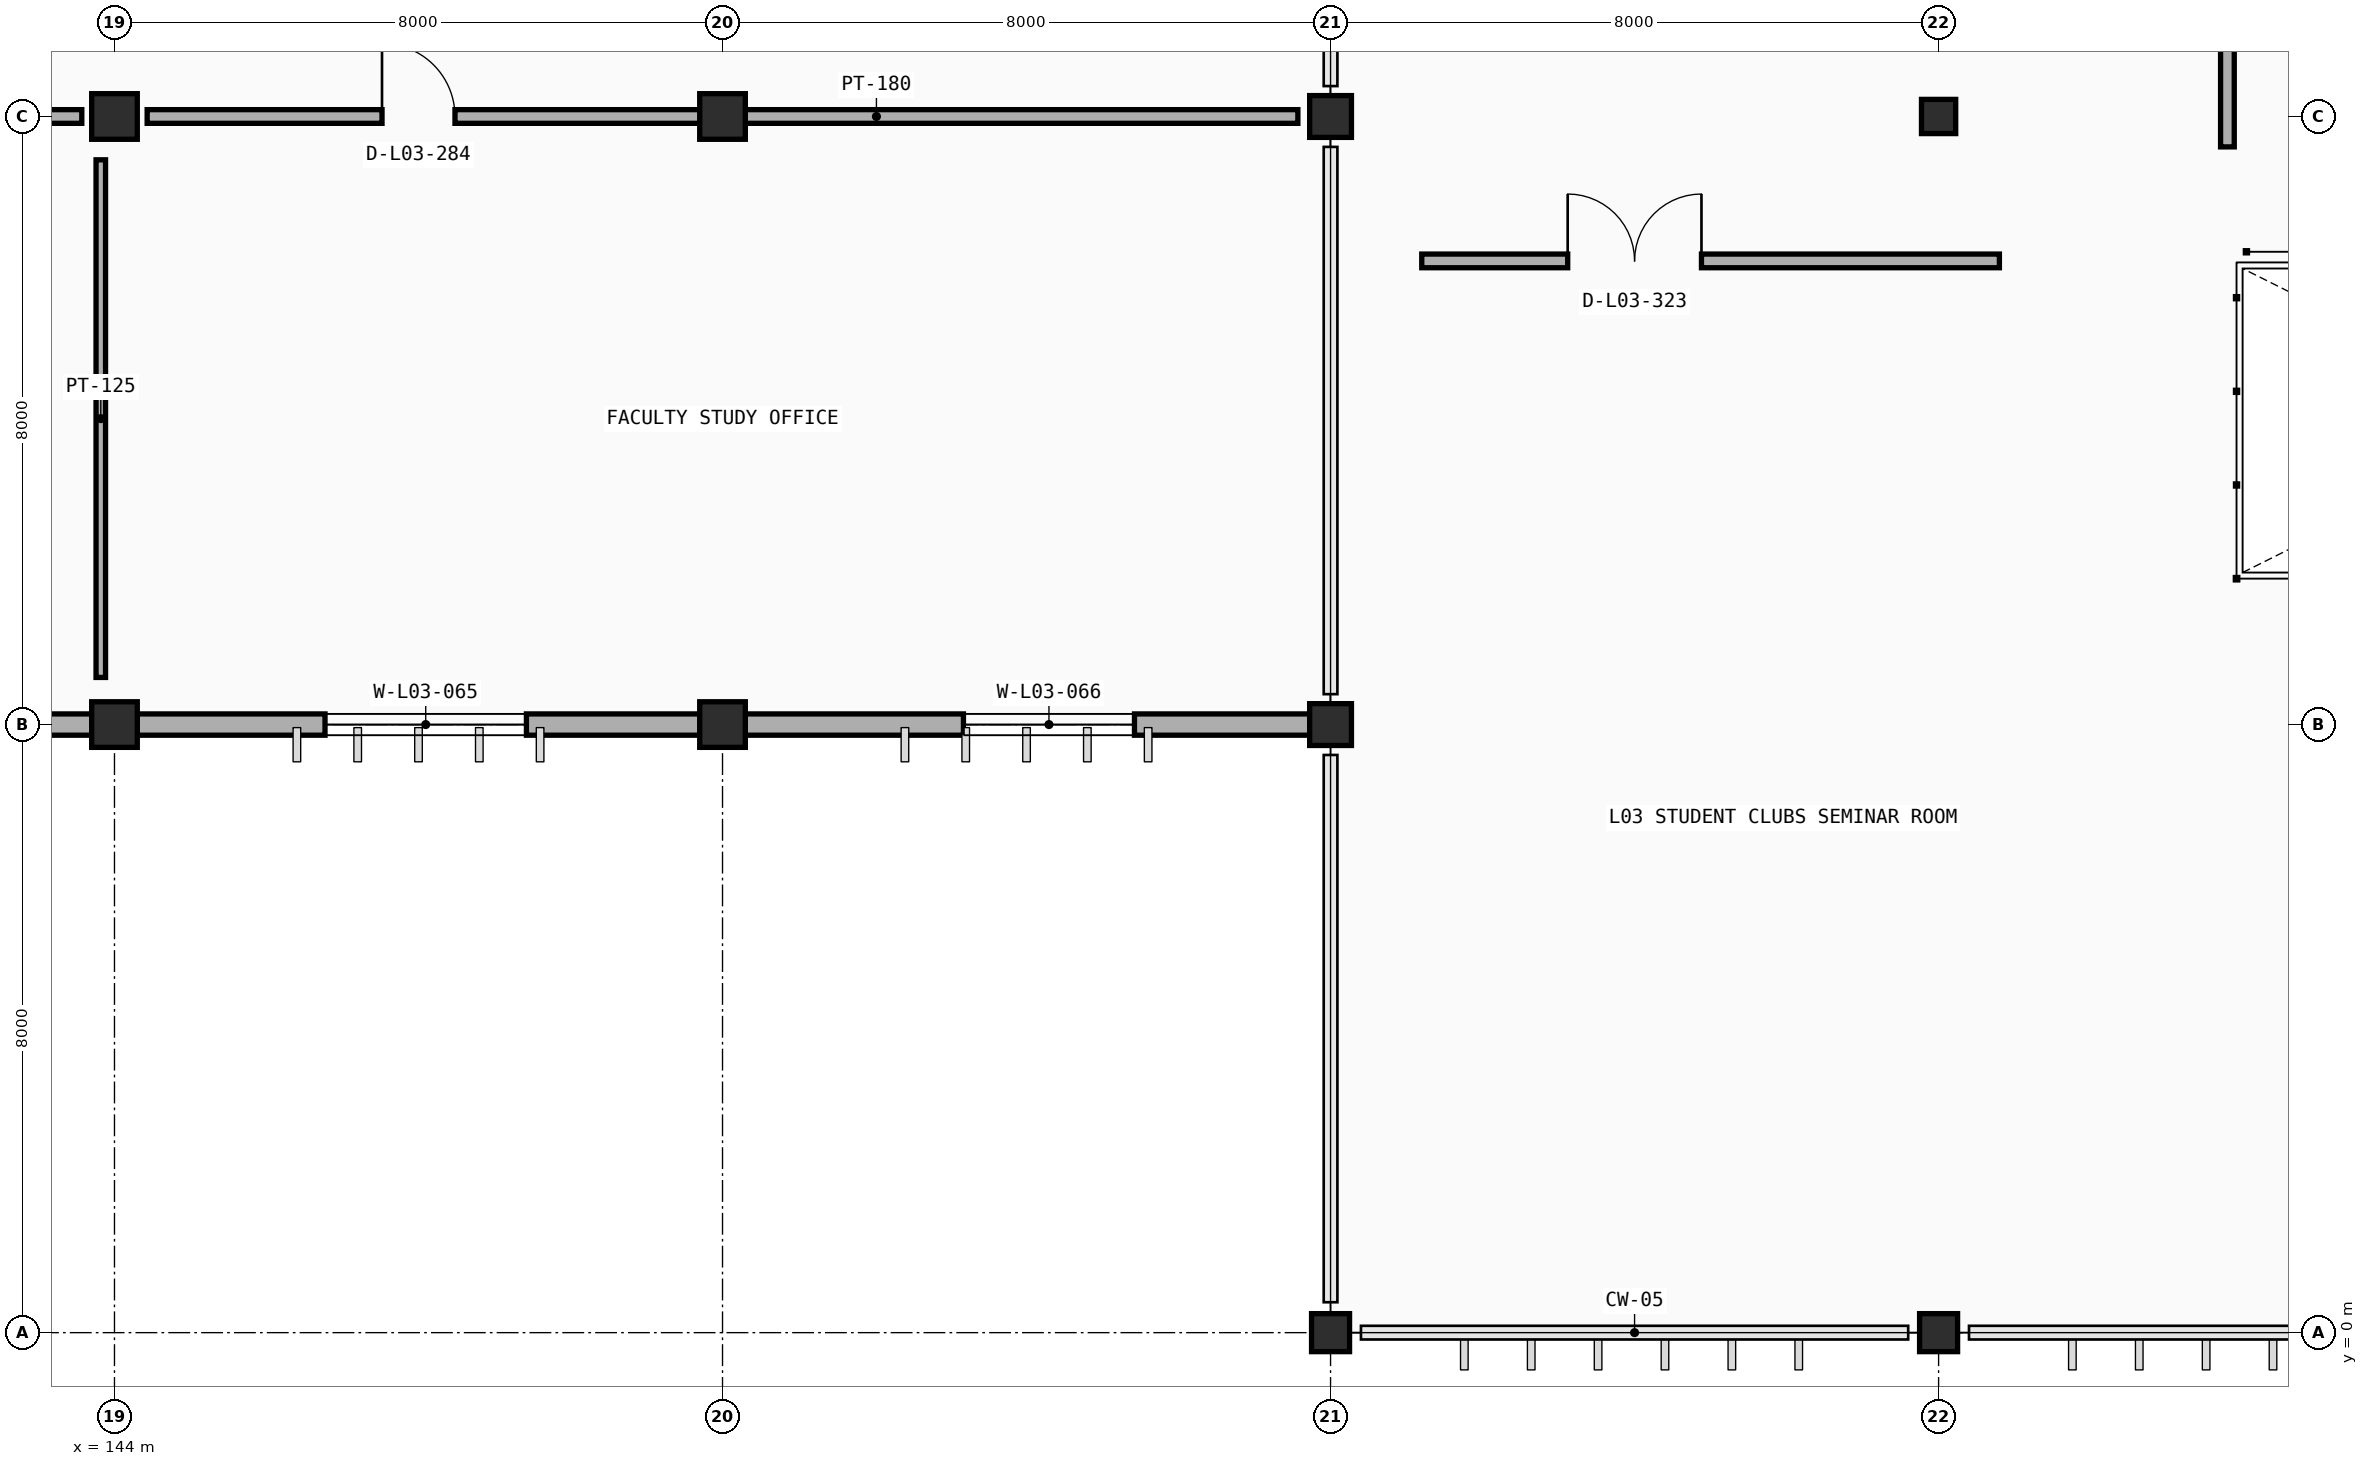
"""IFC4 building model, lengths in metres.
Left out: names, types, materials, properties, quantities, classifications, styles, units other than length and angle.
Written with IfcOpenShell. Run it as: python <this file> out.ifc"""

import sys

from ifc_helpers import new_model, si_unit, direction, frame, frame_2d, origin, origin_2d, place, context, subcontext, project, spatial, rectangle, extrude, element, fill, save


model = new_model("IFC4")
c1 = context("Model", 3, precision=1e-05, world=origin(), true_north=direction((0.0, 1.0)))
c2 = subcontext(c1, "Body", "Model", "MODEL_VIEW")
j1 = project(units=[si_unit("LENGTHUNIT", "METRE"), si_unit("PLANEANGLEUNIT", "RADIAN")], contexts=[c1])
p1 = place(None, origin())
s1 = spatial("IfcSite", under=j1, at=p1, CompositionType="ELEMENT")
p2 = place(p1, origin())
s2 = spatial("IfcBuilding", under=s1, at=p2, CompositionType="ELEMENT")
p3 = place(p2, frame((0.0, 0.0, 9.6)))
s3 = spatial("IfcBuildingStorey", under=s2, at=p3, CompositionType="ELEMENT", Elevation=9.6)
for number, where, z_axis, x_axis in (
    (1, (160.0, 0.0, 0.0), (0.0, 0.0, 1.0), (0.0, 1.0, 0.0)),
    (2, (168.0, 0.0, 0.0), (0.0, 0.0, 1.0), (0.0, 1.0, 0.0)),
):
    element("IfcColumn", number, at=place(p3, frame(where, z_axis=z_axis, x_axis=x_axis)), inside=s3, PredefinedType="COLUMN", context=c2, shape_type="SweptSolid", body=[
        extrude(rectangle(XDim=0.5, YDim=0.5, at=origin_2d()), origin(), (0.0, 0.0, 1.0), 4.2),
    ])
for number, where, z_axis, x_axis in (
    (3, (144.0, 8.0, 0.0), (0.0, 0.0, 1.0), (1.0, 0.0, 0.0)),
    (4, (152.0, 8.0, 0.0), (0.0, 0.0, 1.0), (1.0, 0.0, 0.0)),
):
    element("IfcColumn", number, at=place(p3, frame(where, z_axis=z_axis, x_axis=x_axis)), inside=s3, PredefinedType="COLUMN", context=c2, shape_type="SweptSolid", body=[
        extrude(rectangle(XDim=0.6, YDim=0.6, at=origin_2d()), origin(), (0.0, 0.0, 1.0), 4.2),
    ])
p4 = place(p3, frame((160.0, 8.0, 0.0), z_axis=(0.0, 0.0, 1.0), x_axis=(1.0, 0.0, 0.0)))
e5 = element("IfcColumn", 5, at=p4, inside=s3, PredefinedType="COLUMN", context=c2, shape_type="SweptSolid", body=[
    extrude(rectangle(XDim=0.55, YDim=0.55, at=origin_2d()), origin(), (0.0, 0.0, 1.0), 4.2),
])
for number, where, z_axis, x_axis in (
    (6, (144.0, 16.0, 0.0), (0.0, 0.0, 1.0), (1.0, 0.0, 0.0)),
    (7, (152.0, 16.0, 0.0), (0.0, 0.0, 1.0), (1.0, 0.0, 0.0)),
):
    element("IfcColumn", number, at=place(p3, frame(where, z_axis=z_axis, x_axis=x_axis)), inside=s3, PredefinedType="COLUMN", context=c2, shape_type="SweptSolid", body=[
        extrude(rectangle(XDim=0.6, YDim=0.6, at=origin_2d()), origin(), (0.0, 0.0, 1.0), 4.2),
    ])
p5 = place(p3, frame((160.0, 16.0, 0.0), z_axis=(0.0, 0.0, 1.0), x_axis=(1.0, 0.0, 0.0)))
e8 = element("IfcColumn", 8, at=p5, inside=s3, PredefinedType="COLUMN", context=c2, shape_type="SweptSolid", body=[
    extrude(rectangle(XDim=0.55, YDim=0.55, at=origin_2d()), origin(), (0.0, 0.0, 1.0), 4.2),
])
p6 = place(p3, frame((168.0, 16.0, 0.0), z_axis=(0.0, 0.0, 1.0), x_axis=(1.0, 0.0, 0.0)))
e9 = element("IfcColumn", 9, at=p6, inside=s3, PredefinedType="COLUMN", context=c2, shape_type="SweptSolid", body=[
    extrude(rectangle(XDim=0.45, YDim=0.45, at=origin_2d()), origin(), (0.0, 0.0, 1.0), 4.2),
])
p7 = place(p3, frame((143.703, 8.0, 0.0), z_axis=(0.0, 0.0, 1.0), x_axis=(-1.0, 0.0, 0.0)))
e10 = element("IfcWall", 10, at=p7, inside=s3, PredefinedType="STANDARD", context=c2, shape_type="SweptSolid", body=[
    extrude(rectangle(XDim=7.406, YDim=0.28, at=frame_2d((3.703, 0.0))), origin(), (0.0, 0.0, 1.0), 3.325),
])
p8 = place(p7, frame((2.283, 0.0, 0.9)))
e11 = element("IfcOpeningElement", 11, at=p8, cuts=e10, PredefinedType="OPENING", context=c2, shape_type="SweptSolid", body=[
    extrude(rectangle(XDim=2.45, YDim=1.25, at=frame_2d((1.225, 0.625))), frame((0.0, 0.15, 0.0), z_axis=(0.0, -1.0, 0.0), x_axis=(1.0, 0.0, 0.0)), (0.0, 0.0, 1.0), 0.3),
])
p9 = place(p3, frame((151.703, 8.0, 0.0), z_axis=(0.0, 0.0, 1.0), x_axis=(-1.0, 0.0, 0.0)))
e12 = element("IfcWall", 12, at=p9, inside=s3, PredefinedType="STANDARD", context=c2, shape_type="SweptSolid", body=[
    extrude(rectangle(XDim=7.406, YDim=0.28, at=frame_2d((3.703, 0.0))), origin(), (0.0, 0.0, 1.0), 3.325),
])
p10 = place(p9, frame((2.283, 0.0, 0.9)))
e13 = element("IfcOpeningElement", 13, at=p10, cuts=e12, PredefinedType="OPENING", context=c2, shape_type="SweptSolid", body=[
    extrude(rectangle(XDim=2.65, YDim=1.25, at=frame_2d((1.325, 0.625))), frame((0.0, 0.15, 0.0), z_axis=(0.0, -1.0, 0.0), x_axis=(1.0, 0.0, 0.0)), (0.0, 0.0, 1.0), 0.3),
])
p11 = place(p3, frame((159.728, 8.0, 0.0), z_axis=(0.0, 0.0, 1.0), x_axis=(-1.0, 0.0, 0.0)))
e14 = element("IfcWall", 14, at=p11, inside=s3, PredefinedType="STANDARD", context=c2, shape_type="SweptSolid", body=[
    extrude(rectangle(XDim=7.431, YDim=0.28, at=frame_2d((3.715, 0.0))), origin(), (0.0, 0.0, 1.0), 3.325),
])
p12 = place(p11, frame((2.308, 0.0, 0.9)))
e15 = element("IfcOpeningElement", 15, at=p12, cuts=e14, PredefinedType="OPENING", context=c2, shape_type="SweptSolid", body=[
    extrude(rectangle(XDim=2.25, YDim=1.25, at=frame_2d((1.125, 0.625))), frame((0.0, 0.15, 0.0), z_axis=(0.0, -1.0, 0.0), x_axis=(1.0, 0.0, 0.0)), (0.0, 0.0, 1.0), 0.3),
])
p13 = place(p3, frame((48.22, 0.1, 0.0), z_axis=(0.0, 0.0, 1.0), x_axis=(1.0, 0.0, 0.0)))
e16 = element("IfcWall", 16, at=p13, inside=s3, PredefinedType="PARAPET", context=c2, shape_type="SweptSolid", body=[
    extrude(rectangle(XDim=111.56, YDim=0.18, at=frame_2d((55.78, 0.0))), origin(), (0.0, 0.0, 1.0), 1.15),
])
p14 = place(p3, frame((120.43, 16.0, 0.0), z_axis=(0.0, 0.0, 1.0), x_axis=(1.0, 0.0, 0.0)))
e17 = element("IfcWall", 17, at=p14, inside=s3, PredefinedType="PARTITIONING", context=c2, shape_type="SweptSolid", body=[
    extrude(rectangle(XDim=23.14, YDim=0.18, at=frame_2d((11.57, 0.0))), origin(), (0.0, 0.0, 1.0), 3.275),
])
p15 = place(p14, frame((2.66, 0.0, 0.0)))
e18 = element("IfcOpeningElement", 18, at=p15, cuts=e17, PredefinedType="OPENING", context=c2, shape_type="SweptSolid", body=[
    extrude(rectangle(XDim=1.82, YDim=2.25, at=frame_2d((0.91, 1.125))), frame((0.0, 0.1, 0.0), z_axis=(0.0, -1.0, 0.0), x_axis=(1.0, 0.0, 0.0)), (0.0, 0.0, 1.0), 0.2),
])
p16 = place(p3, frame((143.82, 8.62, 0.0), z_axis=(0.0, 0.0, 1.0), x_axis=(0.0, 1.0, 0.0)))
e19 = element("IfcWall", 19, at=p16, inside=s3, PredefinedType="PARTITIONING", context=c2, shape_type="SweptSolid", body=[
    extrude(rectangle(XDim=6.81, YDim=0.125, at=frame_2d((3.405, 0.0))), origin(), (0.0, 0.0, 1.0), 3.225),
])
p17 = place(p3, frame((144.43, 16.0, 0.0), z_axis=(0.0, 0.0, 1.0), x_axis=(1.0, 0.0, 0.0)))
e20 = element("IfcWall", 20, at=p17, inside=s3, PredefinedType="PARTITIONING", context=c2, shape_type="SweptSolid", body=[
    extrude(rectangle(XDim=15.14, YDim=0.18, at=frame_2d((7.57, 0.0))), origin(), (0.0, 0.0, 1.0), 3.275),
])
p18 = place(p17, frame((3.09, 0.0, 0.0)))
e21 = element("IfcOpeningElement", 21, at=p18, cuts=e20, PredefinedType="OPENING", context=c2, shape_type="SweptSolid", body=[
    extrude(rectangle(XDim=0.96, YDim=2.15, at=frame_2d((0.48, 1.075))), frame((0.0, 0.1, 0.0), z_axis=(0.0, -1.0, 0.0), x_axis=(1.0, 0.0, 0.0)), (0.0, 0.0, 1.0), 0.2),
])
p19 = place(p3, frame((171.8, 15.6, 0.0), z_axis=(0.0, 0.0, 1.0), x_axis=(0.0, 1.0, 0.0)))
e22 = element("IfcWall", 22, at=p19, inside=s3, PredefinedType="PARTITIONING", context=c2, shape_type="SweptSolid", body=[
    extrude(rectangle(XDim=7.6, YDim=0.18, at=frame_2d((3.8, 0.0))), origin(), (0.0, 0.0, 1.0), 3.3),
])
p20 = place(p19, frame((3.925, 0.0, 0.0)))
e23 = element("IfcOpeningElement", 23, at=p20, cuts=e22, PredefinedType="OPENING", context=c2, shape_type="SweptSolid", body=[
    extrude(rectangle(XDim=0.95, YDim=2.1, at=frame_2d((0.475, 1.05))), frame((0.0, 0.1, 0.0), z_axis=(0.0, -1.0, 0.0), x_axis=(1.0, 0.0, 0.0)), (0.0, 0.0, 1.0), 0.2),
])
p21 = place(p3, frame((161.2, 14.1, 0.0), z_axis=(0.0, 0.0, 1.0), x_axis=(1.0, 0.0, 0.0)))
e24 = element("IfcWall", 24, at=p21, inside=s3, PredefinedType="PARTITIONING", context=c2, shape_type="SweptSolid", body=[
    extrude(rectangle(XDim=7.6, YDim=0.18, at=frame_2d((3.8, 0.0))), origin(), (0.0, 0.0, 1.0), 3.3),
])
p22 = place(p21, frame((1.92, 0.0, 0.0)))
e25 = element("IfcOpeningElement", 25, at=p22, cuts=e24, PredefinedType="OPENING", context=c2, shape_type="SweptSolid", body=[
    extrude(rectangle(XDim=1.76, YDim=2.25, at=frame_2d((0.88, 1.125))), frame((0.0, 0.1, 0.0), z_axis=(0.0, -1.0, 0.0), x_axis=(1.0, 0.0, 0.0)), (0.0, 0.0, 1.0), 0.2),
])
p23 = place(p10, origin())
e26 = element("IfcWindow", 26, at=p23, inside=s3, PartitioningType="DOUBLE_PANEL_VERTICAL", PredefinedType="WINDOW", context=c2, shape_type="SweptSolid", body=[
    extrude(rectangle(XDim=2.65, YDim=1.25, at=frame_2d((1.325, 0.625))), frame((0.0, 0.03, 0.0), z_axis=(0.0, -1.0, 0.0), x_axis=(1.0, 0.0, 0.0)), (0.0, 0.0, 1.0), 0.06),
])
fill(e13, e26)
p24 = place(p12, origin())
e27 = element("IfcWindow", 27, at=p24, inside=s3, PartitioningType="DOUBLE_PANEL_VERTICAL", PredefinedType="WINDOW", context=c2, shape_type="SweptSolid", body=[
    extrude(rectangle(XDim=2.25, YDim=1.25, at=frame_2d((1.125, 0.625))), frame((0.0, 0.03, 0.0), z_axis=(0.0, -1.0, 0.0), x_axis=(1.0, 0.0, 0.0)), (0.0, 0.0, 1.0), 0.06),
])
fill(e15, e27)
p25 = place(p18, origin())
e28 = element("IfcDoor", 28, at=p25, inside=s3, OperationType="SINGLE_SWING_LEFT", PredefinedType="DOOR", context=c2, shape_type="SweptSolid", body=[
    extrude(rectangle(XDim=0.96, YDim=2.15, at=frame_2d((0.48, 1.075))), frame((0.0, 0.025, 0.0), z_axis=(0.0, -1.0, 0.0), x_axis=(1.0, 0.0, 0.0)), (0.0, 0.0, 1.0), 0.05),
])
fill(e21, e28)
p26 = place(p22, origin())
e29 = element("IfcDoor", 29, at=p26, inside=s3, OperationType="DOUBLE_DOOR_SINGLE_SWING", PredefinedType="DOOR", context=c2, shape_type="SweptSolid", body=[
    extrude(rectangle(XDim=1.76, YDim=2.25, at=frame_2d((0.88, 1.125))), frame((0.0, 0.025, 0.0), z_axis=(0.0, -1.0, 0.0), x_axis=(1.0, 0.0, 0.0)), (0.0, 0.0, 1.0), 0.05),
])
fill(e25, e29)
save(model, sys.argv[1])
